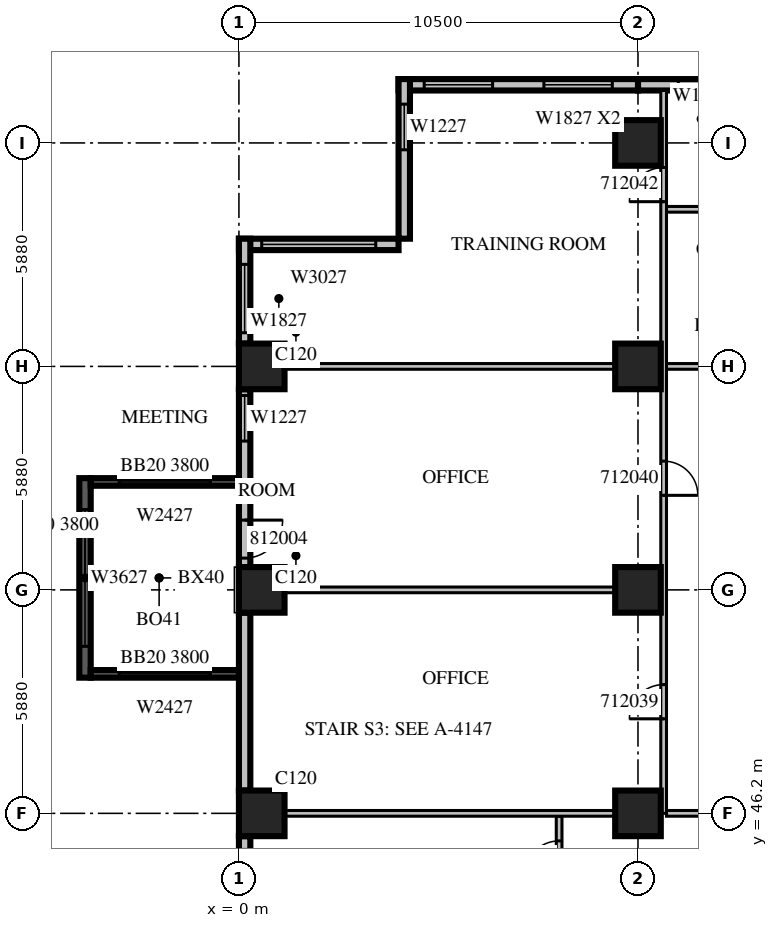
"""IFC4 building model, lengths in metres.
Left out: names, types, materials, properties, quantities, classifications, styles, units other than length and angle.
Written with IfcOpenShell. Run it as: python <this file> out.ifc"""

import sys

from ifc_helpers import new_model, si_unit, direction, frame, frame_2d, origin, origin_2d, place, context, subcontext, project, spatial, rectangle, extrude, source, transform, mapped, element, fill, save


model = new_model("IFC4")
c1 = context("Model", 3, precision=1e-05, world=origin(), true_north=direction((0.0, 1.0)))
c2 = subcontext(c1, "Body", "Model", "MODEL_VIEW")
j1 = project(units=[si_unit("LENGTHUNIT", "METRE"), si_unit("PLANEANGLEUNIT", "RADIAN")], contexts=[c1])
p1 = place(None, origin())
s1 = spatial("IfcSite", under=j1, at=p1, CompositionType="ELEMENT")
p2 = place(p1, origin())
s2 = spatial("IfcBuilding", under=s1, at=p2, CompositionType="ELEMENT")
p3 = place(p2, frame((0.0, 0.0, 61.5)))
s3 = spatial("IfcBuildingStorey", under=s2, at=p3, CompositionType="ELEMENT", Elevation=61.5)
m1 = source(origin(), c2, "Body", "SweptSolid", [
    extrude(rectangle(XDim=1.2, YDim=1.2, at=origin_2d()), origin(), (0.0, 0.0, 1.0), 4.2),
])
for number, where, z_axis, x_axis in (
    (1, (0.6, 46.2, 0.0), (0.0, 0.0, 1.0), (1.0, 0.0, 0.0)),
    (2, (10.5, 46.2, 0.0), (0.0, 0.0, 1.0), (1.0, 0.0, 0.0)),
    (3, (0.6, 52.08, 0.0), (0.0, 0.0, 1.0), (1.0, 0.0, 0.0)),
    (4, (10.5, 52.08, 0.0), (0.0, 0.0, 1.0), (1.0, 0.0, 0.0)),
    (5, (0.6, 57.96, 0.0), (0.0, 0.0, 1.0), (1.0, 0.0, 0.0)),
    (6, (10.5, 57.96, 0.0), (0.0, 0.0, 1.0), (1.0, 0.0, 0.0)),
    (7, (10.5, 63.84, 0.0), (0.0, 0.0, 1.0), (1.0, 0.0, 0.0)),
):
    element("IfcColumn", number, at=place(p3, frame(where, z_axis=z_axis, x_axis=x_axis)), inside=s3, PredefinedType="COLUMN", context=c2, shape_type="MappedRepresentation", body=[
        mapped(m1, transform((0.0, 0.0, 0.0), scale=1.0)),
    ])
m2 = source(origin(), c2, "Body", "SweptSolid", [
    extrude(rectangle(XDim=5.25, YDim=0.3, at=frame_2d((2.625, 0.0))), origin(), (0.0, 0.0, 1.0), 3.8),
])
p4 = place(p3, frame((-4.05, 55.02, 0.0), z_axis=(0.0, 0.0, 1.0), x_axis=(0.0, -1.0, 0.0)))
e8 = element("IfcWall", 8, at=p4, inside=s3, PredefinedType="SOLIDWALL", context=c2, shape_type="MappedRepresentation", body=[
    mapped(m2, transform((0.0, 0.0, 0.0), scale=1.0)),
])
m3 = source(origin(), c2, "Body", "SweptSolid", [
    extrude(rectangle(XDim=3.6, YDim=2.7, at=frame_2d((1.8, 1.35))), frame((0.0, 0.16, 0.0), z_axis=(0.0, -1.0, 0.0), x_axis=(1.0, 0.0, 0.0)), (0.0, 0.0, 1.0), 0.32),
])
p5 = place(p4, frame((0.825, 0.0, 0.6)))
e9 = element("IfcOpeningElement", 9, at=p5, cuts=e8, PredefinedType="OPENING", context=c2, shape_type="MappedRepresentation", body=[
    mapped(m3, transform((0.0, 0.0, 0.0), scale=1.0)),
])
m4 = source(origin(), c2, "Body", "SweptSolid", [
    extrude(rectangle(XDim=3.9, YDim=0.2, at=frame_2d((1.95, 0.0))), origin(), (0.0, 0.0, 1.0), 3.8),
])
p6 = place(p3, frame((0.0, 54.92, 0.0), z_axis=(0.0, 0.0, 1.0), x_axis=(-1.0, 0.0, 0.0)))
e10 = element("IfcWall", 10, at=p6, inside=s3, PredefinedType="SOLIDWALL", context=c2, shape_type="MappedRepresentation", body=[
    mapped(m4, transform((0.0, 0.0, 0.0), scale=1.0)),
])
m5 = source(origin(), c2, "Body", "SweptSolid", [
    extrude(rectangle(XDim=2.4, YDim=2.7, at=frame_2d((1.2, 1.35))), frame((0.0, 0.11, 0.0), z_axis=(0.0, -1.0, 0.0), x_axis=(1.0, 0.0, 0.0)), (0.0, 0.0, 1.0), 0.22),
])
p7 = place(p6, frame((0.75, 0.0, 0.6)))
e11 = element("IfcOpeningElement", 11, at=p7, cuts=e10, PredefinedType="OPENING", context=c2, shape_type="MappedRepresentation", body=[
    mapped(m5, transform((0.0, 0.0, 0.0), scale=1.0)),
])
p8 = place(p3, frame((0.0, 49.87, 0.0), z_axis=(0.0, 0.0, 1.0), x_axis=(-1.0, 0.0, 0.0)))
e12 = element("IfcWall", 12, at=p8, inside=s3, PredefinedType="SOLIDWALL", context=c2, shape_type="MappedRepresentation", body=[
    mapped(m4, transform((0.0, 0.0, 0.0), scale=1.0)),
])
p9 = place(p8, frame((0.75, 0.0, 0.6)))
e13 = element("IfcOpeningElement", 13, at=p9, cuts=e12, PredefinedType="OPENING", context=c2, shape_type="MappedRepresentation", body=[
    mapped(m5, transform((0.0, 0.0, 0.0), scale=1.0)),
])
m6 = source(origin(), c2, "Body", "SweptSolid", [
    extrude(rectangle(XDim=3.15, YDim=0.3, at=frame_2d((1.575, 0.0))), origin(), (0.0, 0.0, 1.0), 3.8),
])
p10 = place(p3, frame((13.65, 65.37, 0.0), z_axis=(0.0, 0.0, 1.0), x_axis=(-1.0, 0.0, 0.0)))
e14 = element("IfcWall", 14, at=p10, inside=s3, PredefinedType="STANDARD", context=c2, shape_type="MappedRepresentation", body=[
    mapped(m6, transform((0.0, 0.0, 0.0), scale=1.0)),
])
m7 = source(origin(), c2, "Body", "SweptSolid", [
    extrude(rectangle(XDim=1.2, YDim=2.7, at=frame_2d((0.6, 1.35))), frame((0.0, 0.16, 0.0), z_axis=(0.0, -1.0, 0.0), x_axis=(1.0, 0.0, 0.0)), (0.0, 0.0, 1.0), 0.32),
])
p11 = place(p10, frame((0.887, 0.0, 0.6)))
e15 = element("IfcOpeningElement", 15, at=p11, cuts=e14, PredefinedType="OPENING", context=c2, shape_type="MappedRepresentation", body=[
    mapped(m7, transform((0.0, 0.0, 0.0), scale=1.0)),
])
m8 = source(origin(), c2, "Body", "SweptSolid", [
    extrude(rectangle(XDim=6.3, YDim=0.3, at=frame_2d((3.15, 0.0))), origin(), (0.0, 0.0, 1.0), 3.8),
])
p12 = place(p3, frame((10.5, 65.37, 0.0), z_axis=(0.0, 0.0, 1.0), x_axis=(-1.0, 0.0, 0.0)))
e16 = element("IfcWall", 16, at=p12, inside=s3, PredefinedType="STANDARD", context=c2, shape_type="MappedRepresentation", body=[
    mapped(m8, transform((0.0, 0.0, 0.0), scale=1.0)),
])
m9 = source(origin(), c2, "Body", "SweptSolid", [
    extrude(rectangle(XDim=1.8, YDim=2.7, at=frame_2d((0.9, 1.35))), frame((0.0, 0.16, 0.0), z_axis=(0.0, -1.0, 0.0), x_axis=(1.0, 0.0, 0.0)), (0.0, 0.0, 1.0), 0.32),
])
p13 = place(p12, frame((0.675, 0.0, 0.6)))
e17 = element("IfcOpeningElement", 17, at=p13, cuts=e16, PredefinedType="OPENING", context=c2, shape_type="MappedRepresentation", body=[
    mapped(m9, transform((0.0, 0.0, 0.0), scale=1.0)),
])
p14 = place(p12, frame((3.825, 0.0, 0.6)))
e18 = element("IfcOpeningElement", 18, at=p14, cuts=e16, PredefinedType="OPENING", context=c2, shape_type="MappedRepresentation", body=[
    mapped(m9, transform((0.0, 0.0, 0.0), scale=1.0)),
])
m10 = source(origin(), c2, "Body", "SweptSolid", [
    extrude(rectangle(XDim=4.2, YDim=0.3, at=frame_2d((2.1, 0.0))), origin(), (0.0, 0.0, 1.0), 3.8),
])
p15 = place(p3, frame((4.35, 65.52, 0.0), z_axis=(0.0, 0.0, 1.0), x_axis=(0.0, -1.0, 0.0)))
e19 = element("IfcWall", 19, at=p15, inside=s3, PredefinedType="STANDARD", context=c2, shape_type="MappedRepresentation", body=[
    mapped(m10, transform((0.0, 0.0, 0.0), scale=1.0)),
])
p16 = place(p15, frame((0.66, 0.0, 0.6)))
e20 = element("IfcOpeningElement", 20, at=p16, cuts=e19, PredefinedType="OPENING", context=c2, shape_type="MappedRepresentation", body=[
    mapped(m7, transform((0.0, 0.0, 0.0), scale=1.0)),
])
p17 = place(p3, frame((4.2, 61.17, 0.0), z_axis=(0.0, 0.0, 1.0), x_axis=(-1.0, 0.0, 0.0)))
e21 = element("IfcWall", 21, at=p17, inside=s3, PredefinedType="STANDARD", context=c2, shape_type="MappedRepresentation", body=[
    mapped(m10, transform((0.0, 0.0, 0.0), scale=1.0)),
])
m11 = source(origin(), c2, "Body", "SweptSolid", [
    extrude(rectangle(XDim=3.0, YDim=2.7, at=frame_2d((1.5, 1.35))), frame((0.0, 0.16, 0.0), z_axis=(0.0, -1.0, 0.0), x_axis=(1.0, 0.0, 0.0)), (0.0, 0.0, 1.0), 0.32),
])
p18 = place(p17, frame((0.6, 0.0, 0.6)))
e22 = element("IfcOpeningElement", 22, at=p18, cuts=e21, PredefinedType="OPENING", context=c2, shape_type="MappedRepresentation", body=[
    mapped(m11, transform((0.0, 0.0, 0.0), scale=1.0)),
])
m12 = source(origin(), c2, "Body", "SweptSolid", [
    extrude(rectangle(XDim=2.76, YDim=0.3, at=frame_2d((1.38, 0.0))), origin(), (0.0, 0.0, 1.0), 3.8),
])
p19 = place(p3, frame((0.15, 61.32, 0.0), z_axis=(0.0, 0.0, 1.0), x_axis=(0.0, -1.0, 0.0)))
e23 = element("IfcWall", 23, at=p19, inside=s3, PredefinedType="STANDARD", context=c2, shape_type="MappedRepresentation", body=[
    mapped(m12, transform((0.0, 0.0, 0.0), scale=1.0)),
])
p20 = place(p19, frame((0.675, 0.0, 0.6)))
e24 = element("IfcOpeningElement", 24, at=p20, cuts=e23, PredefinedType="OPENING", context=c2, shape_type="MappedRepresentation", body=[
    mapped(m9, transform((0.0, 0.0, 0.0), scale=1.0)),
])
m13 = source(origin(), c2, "Body", "SweptSolid", [
    extrude(rectangle(XDim=4.68, YDim=0.3, at=frame_2d((2.34, 0.0))), origin(), (0.0, 0.0, 1.0), 3.8),
])
p21 = place(p3, frame((0.15, 57.36, 0.0), z_axis=(0.0, 0.0, 1.0), x_axis=(0.0, -1.0, 0.0)))
e25 = element("IfcWall", 25, at=p21, inside=s3, PredefinedType="STANDARD", context=c2, shape_type="MappedRepresentation", body=[
    mapped(m13, transform((0.0, 0.0, 0.0), scale=1.0)),
])
p22 = place(p21, frame((0.165, 0.0, 0.6)))
e26 = element("IfcOpeningElement", 26, at=p22, cuts=e25, PredefinedType="OPENING", context=c2, shape_type="MappedRepresentation", body=[
    mapped(m7, transform((0.0, 0.0, 0.0), scale=1.0)),
])
m14 = source(origin(), c2, "Body", "SweptSolid", [
    extrude(rectangle(XDim=1.0, YDim=2.1, at=frame_2d((0.5, 1.05))), frame((0.0, 0.16, 0.0), z_axis=(0.0, -1.0, 0.0), x_axis=(1.0, 0.0, 0.0)), (0.0, 0.0, 1.0), 0.32),
])
p23 = place(p21, frame((3.444, 0.0, 0.0)))
e27 = element("IfcOpeningElement", 27, at=p23, cuts=e25, PredefinedType="OPENING", context=c2, shape_type="MappedRepresentation", body=[
    mapped(m14, transform((0.0, 0.0, 0.0), scale=1.0)),
])
p24 = place(p3, frame((0.15, 51.48, 0.0), z_axis=(0.0, 0.0, 1.0), x_axis=(0.0, -1.0, 0.0)))
e28 = element("IfcWall", 28, at=p24, inside=s3, PredefinedType="STANDARD", context=c2, shape_type="MappedRepresentation", body=[
    mapped(m13, transform((0.0, 0.0, 0.0), scale=1.0)),
])
m15 = source(origin(), c2, "Body", "SweptSolid", [
    extrude(rectangle(XDim=1.6, YDim=0.3, at=frame_2d((0.8, 0.0))), origin(), (0.0, 0.0, 1.0), 3.8),
])
p25 = place(p3, frame((0.15, 45.6, 0.0), z_axis=(0.0, 0.0, 1.0), x_axis=(0.0, -1.0, 0.0)))
e29 = element("IfcWall", 29, at=p25, inside=s3, PredefinedType="STANDARD", context=c2, shape_type="MappedRepresentation", body=[
    mapped(m15, transform((0.0, 0.0, 0.0), scale=1.0)),
])
m16 = source(origin(), c2, "Body", "SweptSolid", [
    extrude(rectangle(XDim=0.9, YDim=2.7, at=frame_2d((0.45, 1.35))), frame((0.0, 0.16, 0.0), z_axis=(0.0, -1.0, 0.0), x_axis=(1.0, 0.0, 0.0)), (0.0, 0.0, 1.0), 0.32),
])
p26 = place(p25, frame((0.35, 0.0, 0.6)))
e30 = element("IfcOpeningElement", 30, at=p26, cuts=e29, PredefinedType="OPENING", context=c2, shape_type="MappedRepresentation", body=[
    mapped(m16, transform((0.0, 0.0, 0.0), scale=1.0)),
])
m17 = source(origin(), c2, "Body", "SweptSolid", [
    extrude(rectangle(XDim=2.2, YDim=0.15, at=frame_2d((1.1, 0.0))), origin(), (0.0, 0.0, 1.0), 3.8),
])
p27 = place(p3, frame((8.425, 43.925, 0.0), z_axis=(0.0, 0.0, 1.0), x_axis=(0.0, 1.0, 0.0)))
e31 = element("IfcWall", 31, at=p27, inside=s3, PredefinedType="PARTITIONING", context=c2, shape_type="MappedRepresentation", body=[
    mapped(m17, transform((0.0, 0.0, 0.0), scale=1.0)),
])
m18 = source(origin(), c2, "Body", "SweptSolid", [
    extrude(rectangle(XDim=0.9, YDim=2.1, at=frame_2d((0.45, 1.05))), frame((0.0, 0.085, 0.0), z_axis=(0.0, -1.0, 0.0), x_axis=(1.0, 0.0, 0.0)), (0.0, 0.0, 1.0), 0.17),
])
p28 = place(p27, frame((0.65, 0.0, 0.0)))
e32 = element("IfcOpeningElement", 32, at=p28, cuts=e31, PredefinedType="OPENING", context=c2, shape_type="MappedRepresentation", body=[
    mapped(m18, transform((0.0, 0.0, 0.0), scale=1.0)),
])
m19 = source(origin(), c2, "Body", "SweptSolid", [
    extrude(rectangle(XDim=8.702, YDim=0.15, at=frame_2d((4.351, 0.0))), origin(), (0.0, 0.0, 1.0), 3.8),
])
p29 = place(p3, frame((9.901, 52.08, 0.0), z_axis=(0.0, 0.0, 1.0), x_axis=(-1.0, 0.0, 0.0)))
e33 = element("IfcWall", 33, at=p29, inside=s3, PredefinedType="PARTITIONING", context=c2, shape_type="MappedRepresentation", body=[
    mapped(m19, transform((0.0, 0.0, 0.0), scale=1.0)),
])
m20 = source(origin(), c2, "Body", "SweptSolid", [
    extrude(rectangle(XDim=3.45, YDim=0.15, at=frame_2d((1.725, 0.0))), origin(), (0.0, 0.0, 1.0), 3.8),
])
p30 = place(p3, frame((14.7, 62.093, 0.0), z_axis=(0.0, 0.0, 1.0), x_axis=(-1.0, 0.0, 0.0)))
e34 = element("IfcWall", 34, at=p30, inside=s3, PredefinedType="PARTITIONING", context=c2, shape_type="MappedRepresentation", body=[
    mapped(m20, transform((0.0, 0.0, 0.0), scale=1.0)),
])
p31 = place(p3, frame((9.901, 46.2, 0.0), z_axis=(0.0, 0.0, 1.0), x_axis=(-1.0, 0.0, 0.0)))
e35 = element("IfcWall", 35, at=p31, inside=s3, PredefinedType="PARTITIONING", context=c2, shape_type="MappedRepresentation", body=[
    mapped(m19, transform((0.0, 0.0, 0.0), scale=1.0)),
])
p32 = place(p3, frame((14.7, 46.2, 0.0), z_axis=(0.0, 0.0, 1.0), x_axis=(-1.0, 0.0, 0.0)))
e36 = element("IfcWall", 36, at=p32, inside=s3, PredefinedType="PARTITIONING", context=c2, shape_type="MappedRepresentation", body=[
    mapped(m20, transform((0.0, 0.0, 0.0), scale=1.0)),
])
p33 = place(p3, frame((9.901, 57.96, 0.0), z_axis=(0.0, 0.0, 1.0), x_axis=(-1.0, 0.0, 0.0)))
e37 = element("IfcWall", 37, at=p33, inside=s3, PredefinedType="PARTITIONING", context=c2, shape_type="MappedRepresentation", body=[
    mapped(m19, transform((0.0, 0.0, 0.0), scale=1.0)),
])
p34 = place(p3, frame((14.7, 57.96, 0.0), z_axis=(0.0, 0.0, 1.0), x_axis=(-1.0, 0.0, 0.0)))
e38 = element("IfcWall", 38, at=p34, inside=s3, PredefinedType="PARTITIONING", context=c2, shape_type="MappedRepresentation", body=[
    mapped(m20, transform((0.0, 0.0, 0.0), scale=1.0)),
])
m21 = source(origin(), c2, "Body", "SweptSolid", [
    extrude(rectangle(XDim=19.02, YDim=0.15, at=frame_2d((9.51, 0.0))), origin(), (0.0, 0.0, 1.0), 3.8),
])
p35 = place(p3, frame((11.175, 46.2, 0.0), z_axis=(0.0, 0.0, 1.0), x_axis=(0.0, 1.0, 0.0)))
e39 = element("IfcWall", 39, at=p35, inside=s3, PredefinedType="PARTITIONING", context=c2, shape_type="MappedRepresentation", body=[
    mapped(m21, transform((0.0, 0.0, 0.0), scale=1.0)),
])
p36 = place(p35, frame((2.487, 0.0, 0.0)))
e40 = element("IfcOpeningElement", 40, at=p36, cuts=e39, PredefinedType="OPENING", context=c2, shape_type="MappedRepresentation", body=[
    mapped(m18, transform((0.0, 0.0, 0.0), scale=1.0)),
])
p37 = place(p35, frame((8.367, 0.0, 0.0)))
e41 = element("IfcOpeningElement", 41, at=p37, cuts=e39, PredefinedType="OPENING", context=c2, shape_type="MappedRepresentation", body=[
    mapped(m18, transform((0.0, 0.0, 0.0), scale=1.0)),
])
p38 = place(p35, frame((16.094, 0.0, 0.0)))
e42 = element("IfcOpeningElement", 42, at=p38, cuts=e39, PredefinedType="OPENING", context=c2, shape_type="MappedRepresentation", body=[
    mapped(m18, transform((0.0, 0.0, 0.0), scale=1.0)),
])
m22 = source(origin(), c2, "Body", "SweptSolid", [
    extrude(rectangle(XDim=3.6, YDim=2.7, at=frame_2d((1.8, 1.35))), frame((0.0, 0.03, 0.0), z_axis=(0.0, -1.0, 0.0), x_axis=(1.0, 0.0, 0.0)), (0.0, 0.0, 1.0), 0.06),
])
p39 = place(p5, origin())
e43 = element("IfcWindow", 43, at=p39, inside=s3, PartitioningType="SINGLE_PANEL", PredefinedType="WINDOW", context=c2, shape_type="MappedRepresentation", body=[
    mapped(m22, transform((0.0, 0.0, 0.0), scale=1.0)),
])
fill(e9, e43)
m23 = source(origin(), c2, "Body", "SweptSolid", [
    extrude(rectangle(XDim=2.4, YDim=2.7, at=frame_2d((1.2, 1.35))), frame((0.0, 0.03, 0.0), z_axis=(0.0, -1.0, 0.0), x_axis=(1.0, 0.0, 0.0)), (0.0, 0.0, 1.0), 0.06),
])
p40 = place(p7, origin())
e44 = element("IfcWindow", 44, at=p40, inside=s3, PartitioningType="SINGLE_PANEL", PredefinedType="WINDOW", context=c2, shape_type="MappedRepresentation", body=[
    mapped(m23, transform((0.0, 0.0, 0.0), scale=1.0)),
])
fill(e11, e44)
p41 = place(p9, origin())
e45 = element("IfcWindow", 45, at=p41, inside=s3, PartitioningType="SINGLE_PANEL", PredefinedType="WINDOW", context=c2, shape_type="MappedRepresentation", body=[
    mapped(m23, transform((0.0, 0.0, 0.0), scale=1.0)),
])
fill(e13, e45)
m24 = source(origin(), c2, "Body", "SweptSolid", [
    extrude(rectangle(XDim=1.2, YDim=2.7, at=frame_2d((0.6, 1.35))), frame((0.0, 0.03, 0.0), z_axis=(0.0, -1.0, 0.0), x_axis=(1.0, 0.0, 0.0)), (0.0, 0.0, 1.0), 0.06),
])
p42 = place(p11, origin())
e46 = element("IfcWindow", 46, at=p42, inside=s3, PartitioningType="SINGLE_PANEL", PredefinedType="WINDOW", context=c2, shape_type="MappedRepresentation", body=[
    mapped(m24, transform((0.0, 0.0, 0.0), scale=1.0)),
])
fill(e15, e46)
m25 = source(origin(), c2, "Body", "SweptSolid", [
    extrude(rectangle(XDim=1.8, YDim=2.7, at=frame_2d((0.9, 1.35))), frame((0.0, 0.03, 0.0), z_axis=(0.0, -1.0, 0.0), x_axis=(1.0, 0.0, 0.0)), (0.0, 0.0, 1.0), 0.06),
])
p43 = place(p13, origin())
e47 = element("IfcWindow", 47, at=p43, inside=s3, PartitioningType="SINGLE_PANEL", PredefinedType="WINDOW", context=c2, shape_type="MappedRepresentation", body=[
    mapped(m25, transform((0.0, 0.0, 0.0), scale=1.0)),
])
fill(e17, e47)
p44 = place(p14, origin())
e48 = element("IfcWindow", 48, at=p44, inside=s3, PartitioningType="SINGLE_PANEL", PredefinedType="WINDOW", context=c2, shape_type="MappedRepresentation", body=[
    mapped(m25, transform((0.0, 0.0, 0.0), scale=1.0)),
])
fill(e18, e48)
p45 = place(p16, origin())
e49 = element("IfcWindow", 49, at=p45, inside=s3, PartitioningType="SINGLE_PANEL", PredefinedType="WINDOW", context=c2, shape_type="MappedRepresentation", body=[
    mapped(m24, transform((0.0, 0.0, 0.0), scale=1.0)),
])
fill(e20, e49)
m26 = source(origin(), c2, "Body", "SweptSolid", [
    extrude(rectangle(XDim=3.0, YDim=2.7, at=frame_2d((1.5, 1.35))), frame((0.0, 0.03, 0.0), z_axis=(0.0, -1.0, 0.0), x_axis=(1.0, 0.0, 0.0)), (0.0, 0.0, 1.0), 0.06),
])
p46 = place(p18, origin())
e50 = element("IfcWindow", 50, at=p46, inside=s3, PartitioningType="SINGLE_PANEL", PredefinedType="WINDOW", context=c2, shape_type="MappedRepresentation", body=[
    mapped(m26, transform((0.0, 0.0, 0.0), scale=1.0)),
])
fill(e22, e50)
p47 = place(p20, origin())
e51 = element("IfcWindow", 51, at=p47, inside=s3, PartitioningType="SINGLE_PANEL", PredefinedType="WINDOW", context=c2, shape_type="MappedRepresentation", body=[
    mapped(m25, transform((0.0, 0.0, 0.0), scale=1.0)),
])
fill(e24, e51)
p48 = place(p22, origin())
e52 = element("IfcWindow", 52, at=p48, inside=s3, PartitioningType="SINGLE_PANEL", PredefinedType="WINDOW", context=c2, shape_type="MappedRepresentation", body=[
    mapped(m24, transform((0.0, 0.0, 0.0), scale=1.0)),
])
fill(e26, e52)
m27 = source(origin(), c2, "Body", "SweptSolid", [
    extrude(rectangle(XDim=0.9, YDim=2.1, at=frame_2d((0.45, 1.05))), frame((0.0, 0.025, 0.0), z_axis=(0.0, -1.0, 0.0), x_axis=(1.0, 0.0, 0.0)), (0.0, 0.0, 1.0), 0.05),
])
p49 = place(p28, origin())
e53 = element("IfcDoor", 53, at=p49, inside=s3, OperationType="SINGLE_SWING_LEFT", PredefinedType="DOOR", context=c2, shape_type="MappedRepresentation", body=[
    mapped(m27, transform((0.0, 0.0, 0.0), scale=1.0)),
])
fill(e32, e53)
p50 = place(p36, origin())
e54 = element("IfcDoor", 54, at=p50, inside=s3, OperationType="SINGLE_SWING_LEFT", PredefinedType="DOOR", context=c2, shape_type="MappedRepresentation", body=[
    mapped(m27, transform((0.0, 0.0, 0.0), scale=1.0)),
])
fill(e40, e54)
p51 = place(p37, origin())
e55 = element("IfcDoor", 55, at=p51, inside=s3, OperationType="SINGLE_SWING_RIGHT", PredefinedType="DOOR", context=c2, shape_type="MappedRepresentation", body=[
    mapped(m27, transform((0.0, 0.0, 0.0), scale=1.0)),
])
fill(e41, e55)
p52 = place(p38, origin())
e56 = element("IfcDoor", 56, at=p52, inside=s3, OperationType="SINGLE_SWING_LEFT", PredefinedType="DOOR", context=c2, shape_type="MappedRepresentation", body=[
    mapped(m27, transform((0.0, 0.0, 0.0), scale=1.0)),
])
fill(e42, e56)
m28 = source(origin(), c2, "Body", "SweptSolid", [
    extrude(rectangle(XDim=1.0, YDim=2.1, at=frame_2d((0.5, 1.05))), frame((0.0, 0.025, 0.0), z_axis=(0.0, -1.0, 0.0), x_axis=(1.0, 0.0, 0.0)), (0.0, 0.0, 1.0), 0.05),
])
p53 = place(p23, origin())
e57 = element("IfcDoor", 57, at=p53, inside=s3, OperationType="SINGLE_SWING_LEFT", PredefinedType="DOOR", context=c2, shape_type="MappedRepresentation", body=[
    mapped(m28, transform((0.0, 0.0, 0.0), scale=1.0)),
])
fill(e27, e57)
save(model, sys.argv[1])
